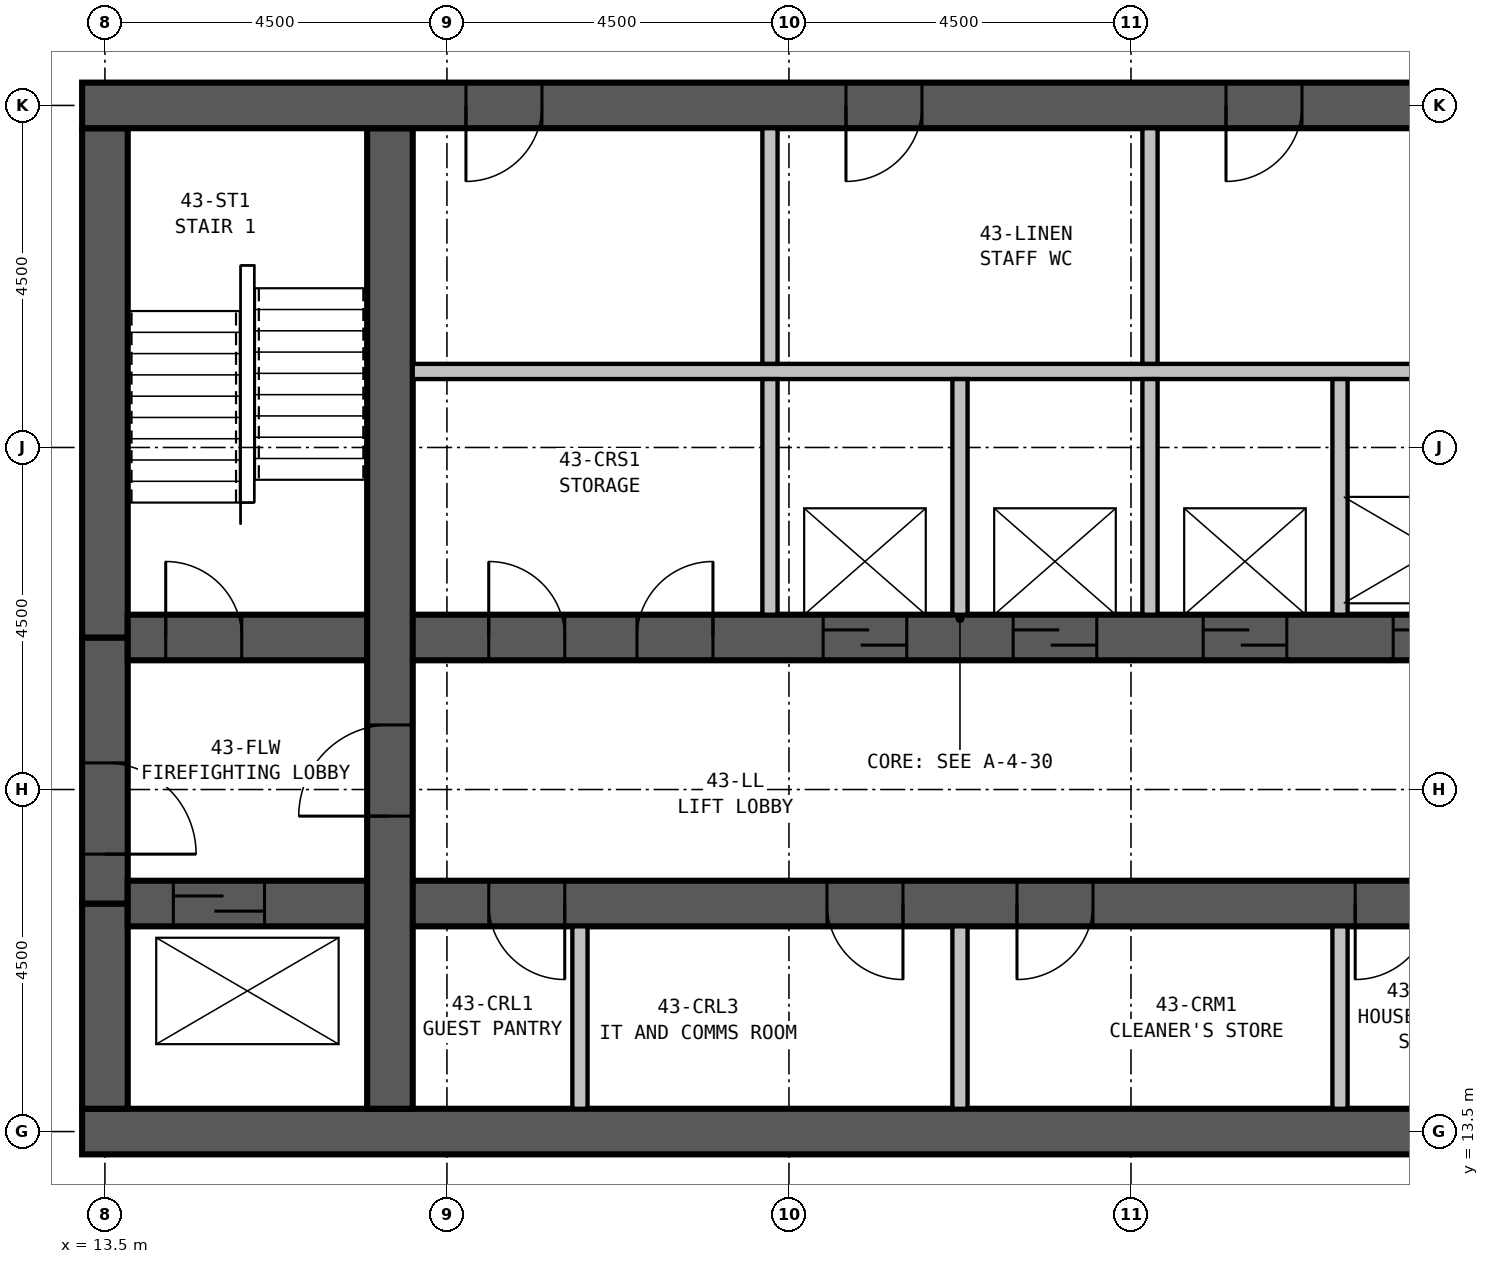
"""IFC4 building model, lengths in metres.
Left out: names, types, materials, properties, quantities, classifications, styles, units other than length and angle.
Written with IfcOpenShell. Run it as: python <this file> out.ifc"""

import sys

from ifc_helpers import new_model, si_unit, direction, frame, frame_2d, origin, place, context, subcontext, project, spatial, rectangle, extrude, element, fill, save


model = new_model("IFC4")
c1 = context("Model", 3, precision=1e-05, world=origin(), true_north=direction((0.0, 1.0)))
c2 = subcontext(c1, "Body", "Model", "MODEL_VIEW")
j1 = project(units=[si_unit("LENGTHUNIT", "METRE"), si_unit("PLANEANGLEUNIT", "RADIAN")], contexts=[c1])
p1 = place(None, origin())
s1 = spatial("IfcSite", under=j1, at=p1, CompositionType="ELEMENT")
p2 = place(p1, origin())
s2 = spatial("IfcBuilding", under=s1, at=p2, CompositionType="ELEMENT")
p3 = place(p2, frame((0.0, 0.0, 169.4)))
s3 = spatial("IfcBuildingStorey", under=s2, at=p3, CompositionType="ELEMENT", Elevation=169.4)
p4 = place(p3, frame((13.2, 13.5, 0.0), z_axis=(0.0, 0.0, 1.0), x_axis=(1.0, 0.0, 0.0)))
e1 = element("IfcWall", 1, at=p4, inside=s3, PredefinedType="SHEAR", context=c2, shape_type="SweptSolid", body=[
    extrude(rectangle(XDim=23.1, YDim=0.6, at=frame_2d((11.55, 0.0))), origin(), (0.0, 0.0, 1.0), 3.5),
])
p5 = place(p3, frame((36.3, 27.0, 0.0), z_axis=(0.0, 0.0, 1.0), x_axis=(-1.0, 0.0, 0.0)))
e2 = element("IfcWall", 2, at=p5, inside=s3, PredefinedType="SHEAR", context=c2, shape_type="SweptSolid", body=[
    extrude(rectangle(XDim=23.1, YDim=0.6, at=frame_2d((11.55, 0.0))), origin(), (0.0, 0.0, 1.0), 3.5),
])
p6 = place(p5, frame((17.05, 0.0, 0.0)))
e3 = element("IfcOpeningElement", 3, at=p6, cuts=e2, PredefinedType="OPENING", context=c2, shape_type="SweptSolid", body=[
    extrude(rectangle(XDim=1.0, YDim=2.1, at=frame_2d((0.5, 1.05))), frame((0.0, 0.31, 0.0), z_axis=(0.0, -1.0, 0.0), x_axis=(1.0, 0.0, 0.0)), (0.0, 0.0, 1.0), 0.62),
])
p7 = place(p5, frame((12.05, 0.0, 0.0)))
e4 = element("IfcOpeningElement", 4, at=p7, cuts=e2, PredefinedType="OPENING", context=c2, shape_type="SweptSolid", body=[
    extrude(rectangle(XDim=1.0, YDim=2.1, at=frame_2d((0.5, 1.05))), frame((0.0, 0.31, 0.0), z_axis=(0.0, -1.0, 0.0), x_axis=(1.0, 0.0, 0.0)), (0.0, 0.0, 1.0), 0.62),
])
p8 = place(p5, frame((7.05, 0.0, 0.0)))
e5 = element("IfcOpeningElement", 5, at=p8, cuts=e2, PredefinedType="OPENING", context=c2, shape_type="SweptSolid", body=[
    extrude(rectangle(XDim=1.0, YDim=2.1, at=frame_2d((0.5, 1.05))), frame((0.0, 0.31, 0.0), z_axis=(0.0, -1.0, 0.0), x_axis=(1.0, 0.0, 0.0)), (0.0, 0.0, 1.0), 0.62),
])
p9 = place(p3, frame((17.25, 13.8, 0.0), z_axis=(0.0, 0.0, 1.0), x_axis=(0.0, 1.0, 0.0)))
e6 = element("IfcWall", 6, at=p9, inside=s3, PredefinedType="SHEAR", context=c2, shape_type="SweptSolid", body=[
    extrude(rectangle(XDim=12.9, YDim=0.6, at=frame_2d((6.45, 0.0))), origin(), (0.0, 0.0, 1.0), 3.5),
])
p10 = place(p9, frame((3.85, 0.0, 0.0)))
e7 = element("IfcOpeningElement", 7, at=p10, cuts=e6, PredefinedType="OPENING", context=c2, shape_type="SweptSolid", body=[
    extrude(rectangle(XDim=1.2, YDim=2.1, at=frame_2d((0.6, 1.05))), frame((0.0, 0.31, 0.0), z_axis=(0.0, -1.0, 0.0), x_axis=(1.0, 0.0, 0.0)), (0.0, 0.0, 1.0), 0.62),
])
p11 = place(p3, frame((13.8, 16.5, 0.0), z_axis=(0.0, 0.0, 1.0), x_axis=(1.0, 0.0, 0.0)))
e8 = element("IfcWall", 8, at=p11, inside=s3, PredefinedType="SHEAR", context=c2, shape_type="SweptSolid", body=[
    extrude(rectangle(XDim=21.9, YDim=0.6, at=frame_2d((10.95, 0.0))), origin(), (0.0, 0.0, 1.0), 3.5),
])
p12 = place(p11, frame((5.75, 0.0, 0.0), z_axis=(0.0, 0.0, 1.0), x_axis=(-1.0, 0.0, 0.0)))
e9 = element("IfcOpeningElement", 9, at=p12, cuts=e8, PredefinedType="OPENING", context=c2, shape_type="SweptSolid", body=[
    extrude(rectangle(XDim=1.0, YDim=2.1, at=frame_2d((0.5, 1.05))), frame((0.0, 0.31, 0.0), z_axis=(0.0, -1.0, 0.0), x_axis=(1.0, 0.0, 0.0)), (0.0, 0.0, 1.0), 0.62),
])
p13 = place(p11, frame((10.2, 0.0, 0.0), z_axis=(0.0, 0.0, 1.0), x_axis=(-1.0, 0.0, 0.0)))
e10 = element("IfcOpeningElement", 10, at=p13, cuts=e8, PredefinedType="OPENING", context=c2, shape_type="SweptSolid", body=[
    extrude(rectangle(XDim=1.0, YDim=2.1, at=frame_2d((0.5, 1.05))), frame((0.0, 0.31, 0.0), z_axis=(0.0, -1.0, 0.0), x_axis=(1.0, 0.0, 0.0)), (0.0, 0.0, 1.0), 0.62),
])
p14 = place(p11, frame((12.7, 0.0, 0.0), z_axis=(0.0, 0.0, 1.0), x_axis=(-1.0, 0.0, 0.0)))
e11 = element("IfcOpeningElement", 11, at=p14, cuts=e8, PredefinedType="OPENING", context=c2, shape_type="SweptSolid", body=[
    extrude(rectangle(XDim=1.0, YDim=2.1, at=frame_2d((0.5, 1.05))), frame((0.0, 0.31, 0.0), z_axis=(0.0, -1.0, 0.0), x_axis=(1.0, 0.0, 0.0)), (0.0, 0.0, 1.0), 0.62),
])
p15 = place(p11, frame((17.15, 0.0, 0.0), z_axis=(0.0, 0.0, 1.0), x_axis=(-1.0, 0.0, 0.0)))
e12 = element("IfcOpeningElement", 12, at=p15, cuts=e8, PredefinedType="OPENING", context=c2, shape_type="SweptSolid", body=[
    extrude(rectangle(XDim=1.0, YDim=2.1, at=frame_2d((0.5, 1.05))), frame((0.0, 0.31, 0.0), z_axis=(0.0, -1.0, 0.0), x_axis=(1.0, 0.0, 0.0)), (0.0, 0.0, 1.0), 0.62),
])
p16 = place(p11, frame((0.6, 0.0, 0.0)))
e13 = element("IfcOpeningElement", 13, at=p16, cuts=e8, PredefinedType="OPENING", context=c2, shape_type="SweptSolid", body=[
    extrude(rectangle(XDim=1.2, YDim=2.1, at=frame_2d((0.6, 1.05))), frame((0.0, 0.31, 0.0), z_axis=(0.0, -1.0, 0.0), x_axis=(1.0, 0.0, 0.0)), (0.0, 0.0, 1.0), 0.62),
])
p17 = place(p11, frame((19.6, 0.0, 0.0)))
e14 = element("IfcOpeningElement", 14, at=p17, cuts=e8, PredefinedType="OPENING", context=c2, shape_type="SweptSolid", body=[
    extrude(rectangle(XDim=1.2, YDim=2.1, at=frame_2d((0.6, 1.05))), frame((0.0, 0.31, 0.0), z_axis=(0.0, -1.0, 0.0), x_axis=(1.0, 0.0, 0.0)), (0.0, 0.0, 1.0), 0.62),
])
p18 = place(p3, frame((13.8, 20.0, 0.0), z_axis=(0.0, 0.0, 1.0), x_axis=(1.0, 0.0, 0.0)))
e15 = element("IfcWall", 15, at=p18, inside=s3, PredefinedType="SHEAR", context=c2, shape_type="SweptSolid", body=[
    extrude(rectangle(XDim=21.9, YDim=0.6, at=frame_2d((10.95, 0.0))), origin(), (0.0, 0.0, 1.0), 3.5),
])
p19 = place(p18, frame((0.5, 0.0, 0.0)))
e16 = element("IfcOpeningElement", 16, at=p19, cuts=e15, PredefinedType="OPENING", context=c2, shape_type="SweptSolid", body=[
    extrude(rectangle(XDim=1.0, YDim=2.1, at=frame_2d((0.5, 1.05))), frame((0.0, 0.31, 0.0), z_axis=(0.0, -1.0, 0.0), x_axis=(1.0, 0.0, 0.0)), (0.0, 0.0, 1.0), 0.62),
])
p20 = place(p18, frame((20.5, 0.0, 0.0)))
e17 = element("IfcOpeningElement", 17, at=p20, cuts=e15, PredefinedType="OPENING", context=c2, shape_type="SweptSolid", body=[
    extrude(rectangle(XDim=1.0, YDim=2.1, at=frame_2d((0.5, 1.05))), frame((0.0, 0.31, 0.0), z_axis=(0.0, -1.0, 0.0), x_axis=(1.0, 0.0, 0.0)), (0.0, 0.0, 1.0), 0.62),
])
p21 = place(p18, frame((9.15, 0.0, 0.0)))
e18 = element("IfcOpeningElement", 18, at=p21, cuts=e15, PredefinedType="OPENING", context=c2, shape_type="SweptSolid", body=[
    extrude(rectangle(XDim=1.1, YDim=2.1, at=frame_2d((0.55, 1.05))), frame((0.0, 0.31, 0.0), z_axis=(0.0, -1.0, 0.0), x_axis=(1.0, 0.0, 0.0)), (0.0, 0.0, 1.0), 0.62),
])
p22 = place(p18, frame((11.65, 0.0, 0.0)))
e19 = element("IfcOpeningElement", 19, at=p22, cuts=e15, PredefinedType="OPENING", context=c2, shape_type="SweptSolid", body=[
    extrude(rectangle(XDim=1.1, YDim=2.1, at=frame_2d((0.55, 1.05))), frame((0.0, 0.31, 0.0), z_axis=(0.0, -1.0, 0.0), x_axis=(1.0, 0.0, 0.0)), (0.0, 0.0, 1.0), 0.62),
])
p23 = place(p18, frame((14.15, 0.0, 0.0)))
e20 = element("IfcOpeningElement", 20, at=p23, cuts=e15, PredefinedType="OPENING", context=c2, shape_type="SweptSolid", body=[
    extrude(rectangle(XDim=1.1, YDim=2.1, at=frame_2d((0.55, 1.05))), frame((0.0, 0.31, 0.0), z_axis=(0.0, -1.0, 0.0), x_axis=(1.0, 0.0, 0.0)), (0.0, 0.0, 1.0), 0.62),
])
p24 = place(p18, frame((16.65, 0.0, 0.0)))
e21 = element("IfcOpeningElement", 21, at=p24, cuts=e15, PredefinedType="OPENING", context=c2, shape_type="SweptSolid", body=[
    extrude(rectangle(XDim=1.1, YDim=2.1, at=frame_2d((0.55, 1.05))), frame((0.0, 0.31, 0.0), z_axis=(0.0, -1.0, 0.0), x_axis=(1.0, 0.0, 0.0)), (0.0, 0.0, 1.0), 0.62),
])
p25 = place(p18, frame((4.75, 0.0, 0.0)))
e22 = element("IfcOpeningElement", 22, at=p25, cuts=e15, PredefinedType="OPENING", context=c2, shape_type="SweptSolid", body=[
    extrude(rectangle(XDim=1.0, YDim=2.1, at=frame_2d((0.5, 1.05))), frame((0.0, 0.31, 0.0), z_axis=(0.0, -1.0, 0.0), x_axis=(1.0, 0.0, 0.0)), (0.0, 0.0, 1.0), 0.62),
])
p26 = place(p18, frame((6.7, 0.0, 0.0)))
e23 = element("IfcOpeningElement", 23, at=p26, cuts=e15, PredefinedType="OPENING", context=c2, shape_type="SweptSolid", body=[
    extrude(rectangle(XDim=1.0, YDim=2.1, at=frame_2d((0.5, 1.05))), frame((0.0, 0.31, 0.0), z_axis=(0.0, -1.0, 0.0), x_axis=(1.0, 0.0, 0.0)), (0.0, 0.0, 1.0), 0.62),
])
p27 = place(p3, frame((13.5, 26.7, 0.0), z_axis=(0.0, 0.0, 1.0), x_axis=(0.0, -1.0, 0.0)))
e24 = element("IfcWall", 24, at=p27, inside=s3, PredefinedType="SHEAR", context=c2, shape_type="SweptSolid", body=[
    extrude(rectangle(XDim=6.7, YDim=0.6, at=frame_2d((3.35, 0.0))), origin(), (0.0, 0.0, 1.0), 3.5),
])
p28 = place(p3, frame((13.5, 20.0, 0.0), z_axis=(0.0, 0.0, 1.0), x_axis=(0.0, -1.0, 0.0)))
e25 = element("IfcWall", 25, at=p28, inside=s3, PredefinedType="SHEAR", context=c2, shape_type="SweptSolid", body=[
    extrude(rectangle(XDim=3.5, YDim=0.6, at=frame_2d((1.75, 0.0))), origin(), (0.0, 0.0, 1.0), 3.5),
])
p29 = place(p28, frame((1.65, 0.0, 0.0)))
e26 = element("IfcOpeningElement", 26, at=p29, cuts=e25, PredefinedType="OPENING", context=c2, shape_type="SweptSolid", body=[
    extrude(rectangle(XDim=1.2, YDim=2.1, at=frame_2d((0.6, 1.05))), frame((0.0, 0.31, 0.0), z_axis=(0.0, -1.0, 0.0), x_axis=(1.0, 0.0, 0.0)), (0.0, 0.0, 1.0), 0.62),
])
p30 = place(p3, frame((13.5, 16.5, 0.0), z_axis=(0.0, 0.0, 1.0), x_axis=(0.0, -1.0, 0.0)))
e27 = element("IfcWall", 27, at=p30, inside=s3, PredefinedType="SHEAR", context=c2, shape_type="SweptSolid", body=[
    extrude(rectangle(XDim=2.7, YDim=0.6, at=frame_2d((1.35, 0.0))), origin(), (0.0, 0.0, 1.0), 3.5),
])
p31 = place(p3, frame((19.75, 13.8, 0.0), z_axis=(0.0, 0.0, 1.0), x_axis=(0.0, 1.0, 0.0)))
e28 = element("IfcWall", 28, at=p31, inside=s3, PredefinedType="PARTITIONING", context=c2, shape_type="SweptSolid", body=[
    extrude(rectangle(XDim=2.4, YDim=0.2, at=frame_2d((1.2, 0.0))), origin(), (0.0, 0.0, 1.0), 3.25),
])
p32 = place(p3, frame((22.25, 20.3, 0.0), z_axis=(0.0, 0.0, 1.0), x_axis=(0.0, 1.0, 0.0)))
e29 = element("IfcWall", 29, at=p32, inside=s3, PredefinedType="PARTITIONING", context=c2, shape_type="SweptSolid", body=[
    extrude(rectangle(XDim=3.1, YDim=0.2, at=frame_2d((1.55, 0.0))), origin(), (0.0, 0.0, 1.0), 3.25),
])
p33 = place(p3, frame((24.75, 13.8, 0.0), z_axis=(0.0, 0.0, 1.0), x_axis=(0.0, 1.0, 0.0)))
e30 = element("IfcWall", 30, at=p33, inside=s3, PredefinedType="PARTITIONING", context=c2, shape_type="SweptSolid", body=[
    extrude(rectangle(XDim=2.4, YDim=0.2, at=frame_2d((1.2, 0.0))), origin(), (0.0, 0.0, 1.0), 3.25),
])
for number, where, z_axis, x_axis in (
    (31, (24.75, 20.3, 0.0), (0.0, 0.0, 1.0), (0.0, 1.0, 0.0)),
    (32, (27.25, 20.3, 0.0), (0.0, 0.0, 1.0), (0.0, 1.0, 0.0)),
):
    element("IfcWall", number, at=place(p3, frame(where, z_axis=z_axis, x_axis=x_axis)), inside=s3, PredefinedType="PARTITIONING", context=c2, shape_type="SweptSolid", body=[
        extrude(rectangle(XDim=3.1, YDim=0.2, at=frame_2d((1.55, 0.0))), origin(), (0.0, 0.0, 1.0), 3.25),
    ])
p34 = place(p3, frame((29.75, 13.8, 0.0), z_axis=(0.0, 0.0, 1.0), x_axis=(0.0, 1.0, 0.0)))
e33 = element("IfcWall", 33, at=p34, inside=s3, PredefinedType="PARTITIONING", context=c2, shape_type="SweptSolid", body=[
    extrude(rectangle(XDim=2.4, YDim=0.2, at=frame_2d((1.2, 0.0))), origin(), (0.0, 0.0, 1.0), 3.25),
])
p35 = place(p3, frame((29.75, 20.3, 0.0), z_axis=(0.0, 0.0, 1.0), x_axis=(0.0, 1.0, 0.0)))
e34 = element("IfcWall", 34, at=p35, inside=s3, PredefinedType="PARTITIONING", context=c2, shape_type="SweptSolid", body=[
    extrude(rectangle(XDim=3.1, YDim=0.2, at=frame_2d((1.55, 0.0))), origin(), (0.0, 0.0, 1.0), 3.25),
])
p36 = place(p3, frame((17.55, 23.5, 0.0), z_axis=(0.0, 0.0, 1.0), x_axis=(1.0, 0.0, 0.0)))
e35 = element("IfcWall", 35, at=p36, inside=s3, PredefinedType="PARTITIONING", context=c2, shape_type="SweptSolid", body=[
    extrude(rectangle(XDim=14.4, YDim=0.2, at=frame_2d((7.2, 0.0))), origin(), (0.0, 0.0, 1.0), 3.25),
])
for number, where, z_axis, x_axis in (
    (36, (22.25, 23.6, 0.0), (0.0, 0.0, 1.0), (0.0, 1.0, 0.0)),
    (37, (27.25, 23.6, 0.0), (0.0, 0.0, 1.0), (0.0, 1.0, 0.0)),
):
    element("IfcWall", number, at=place(p3, frame(where, z_axis=z_axis, x_axis=x_axis)), inside=s3, PredefinedType="PARTITIONING", context=c2, shape_type="SweptSolid", body=[
        extrude(rectangle(XDim=3.1, YDim=0.2, at=frame_2d((1.55, 0.0))), origin(), (0.0, 0.0, 1.0), 3.25),
    ])
p37 = place(p29, origin())
e38 = element("IfcDoor", 38, at=p37, inside=s3, OperationType="SINGLE_SWING_RIGHT", PredefinedType="DOOR", context=c2, shape_type="SweptSolid", body=[
    extrude(rectangle(XDim=1.2, YDim=2.1, at=frame_2d((0.6, 1.05))), frame((0.0, 0.3, 0.0), z_axis=(0.0, -1.0, 0.0), x_axis=(1.0, 0.0, 0.0)), (0.0, 0.0, 1.0), 0.6),
])
fill(e26, e38)
p38 = place(p10, origin())
e39 = element("IfcDoor", 39, at=p38, inside=s3, OperationType="SINGLE_SWING_LEFT", PredefinedType="DOOR", context=c2, shape_type="SweptSolid", body=[
    extrude(rectangle(XDim=1.2, YDim=2.1, at=frame_2d((0.6, 1.05))), frame((0.0, 0.3, 0.0), z_axis=(0.0, -1.0, 0.0), x_axis=(1.0, 0.0, 0.0)), (0.0, 0.0, 1.0), 0.6),
])
fill(e7, e39)
p39 = place(p19, origin())
e40 = element("IfcDoor", 40, at=p39, inside=s3, OperationType="SINGLE_SWING_LEFT", PredefinedType="DOOR", context=c2, shape_type="SweptSolid", body=[
    extrude(rectangle(XDim=1.0, YDim=2.1, at=frame_2d((0.5, 1.05))), frame((0.0, 0.3, 0.0), z_axis=(0.0, -1.0, 0.0), x_axis=(1.0, 0.0, 0.0)), (0.0, 0.0, 1.0), 0.6),
])
fill(e16, e40)
p40 = place(p21, origin())
e41 = element("IfcDoor", 41, at=p40, inside=s3, OperationType="SLIDING_TO_LEFT", PredefinedType="DOOR", context=c2, shape_type="SweptSolid", body=[
    extrude(rectangle(XDim=1.1, YDim=2.1, at=frame_2d((0.55, 1.05))), frame((0.0, 0.3, 0.0), z_axis=(0.0, -1.0, 0.0), x_axis=(1.0, 0.0, 0.0)), (0.0, 0.0, 1.0), 0.6),
])
fill(e18, e41)
p41 = place(p22, origin())
e42 = element("IfcDoor", 42, at=p41, inside=s3, OperationType="SLIDING_TO_LEFT", PredefinedType="DOOR", context=c2, shape_type="SweptSolid", body=[
    extrude(rectangle(XDim=1.1, YDim=2.1, at=frame_2d((0.55, 1.05))), frame((0.0, 0.3, 0.0), z_axis=(0.0, -1.0, 0.0), x_axis=(1.0, 0.0, 0.0)), (0.0, 0.0, 1.0), 0.6),
])
fill(e19, e42)
p42 = place(p23, origin())
e43 = element("IfcDoor", 43, at=p42, inside=s3, OperationType="SLIDING_TO_LEFT", PredefinedType="DOOR", context=c2, shape_type="SweptSolid", body=[
    extrude(rectangle(XDim=1.1, YDim=2.1, at=frame_2d((0.55, 1.05))), frame((0.0, 0.3, 0.0), z_axis=(0.0, -1.0, 0.0), x_axis=(1.0, 0.0, 0.0)), (0.0, 0.0, 1.0), 0.6),
])
fill(e20, e43)
p43 = place(p24, origin())
e44 = element("IfcDoor", 44, at=p43, inside=s3, OperationType="SLIDING_TO_LEFT", PredefinedType="DOOR", context=c2, shape_type="SweptSolid", body=[
    extrude(rectangle(XDim=1.1, YDim=2.1, at=frame_2d((0.55, 1.05))), frame((0.0, 0.3, 0.0), z_axis=(0.0, -1.0, 0.0), x_axis=(1.0, 0.0, 0.0)), (0.0, 0.0, 1.0), 0.6),
])
fill(e21, e44)
p44 = place(p12, origin())
e45 = element("IfcDoor", 45, at=p44, inside=s3, OperationType="SINGLE_SWING_LEFT", PredefinedType="DOOR", context=c2, shape_type="SweptSolid", body=[
    extrude(rectangle(XDim=1.0, YDim=2.1, at=frame_2d((0.5, 1.05))), frame((0.0, 0.3, 0.0), z_axis=(0.0, -1.0, 0.0), x_axis=(1.0, 0.0, 0.0)), (0.0, 0.0, 1.0), 0.6),
])
fill(e9, e45)
p45 = place(p13, origin())
e46 = element("IfcDoor", 46, at=p45, inside=s3, OperationType="SINGLE_SWING_LEFT", PredefinedType="DOOR", context=c2, shape_type="SweptSolid", body=[
    extrude(rectangle(XDim=1.0, YDim=2.1, at=frame_2d((0.5, 1.05))), frame((0.0, 0.3, 0.0), z_axis=(0.0, -1.0, 0.0), x_axis=(1.0, 0.0, 0.0)), (0.0, 0.0, 1.0), 0.6),
])
fill(e10, e46)
p46 = place(p14, origin())
e47 = element("IfcDoor", 47, at=p46, inside=s3, OperationType="SINGLE_SWING_RIGHT", PredefinedType="DOOR", context=c2, shape_type="SweptSolid", body=[
    extrude(rectangle(XDim=1.0, YDim=2.1, at=frame_2d((0.5, 1.05))), frame((0.0, 0.3, 0.0), z_axis=(0.0, -1.0, 0.0), x_axis=(1.0, 0.0, 0.0)), (0.0, 0.0, 1.0), 0.6),
])
fill(e11, e47)
p47 = place(p15, origin())
e48 = element("IfcDoor", 48, at=p47, inside=s3, OperationType="SINGLE_SWING_RIGHT", PredefinedType="DOOR", context=c2, shape_type="SweptSolid", body=[
    extrude(rectangle(XDim=1.0, YDim=2.1, at=frame_2d((0.5, 1.05))), frame((0.0, 0.3, 0.0), z_axis=(0.0, -1.0, 0.0), x_axis=(1.0, 0.0, 0.0)), (0.0, 0.0, 1.0), 0.6),
])
fill(e12, e48)
p48 = place(p25, origin())
e49 = element("IfcDoor", 49, at=p48, inside=s3, OperationType="SINGLE_SWING_LEFT", PredefinedType="DOOR", context=c2, shape_type="SweptSolid", body=[
    extrude(rectangle(XDim=1.0, YDim=2.1, at=frame_2d((0.5, 1.05))), frame((0.0, 0.3, 0.0), z_axis=(0.0, -1.0, 0.0), x_axis=(1.0, 0.0, 0.0)), (0.0, 0.0, 1.0), 0.6),
])
fill(e22, e49)
p49 = place(p26, origin())
e50 = element("IfcDoor", 50, at=p49, inside=s3, OperationType="SINGLE_SWING_RIGHT", PredefinedType="DOOR", context=c2, shape_type="SweptSolid", body=[
    extrude(rectangle(XDim=1.0, YDim=2.1, at=frame_2d((0.5, 1.05))), frame((0.0, 0.3, 0.0), z_axis=(0.0, -1.0, 0.0), x_axis=(1.0, 0.0, 0.0)), (0.0, 0.0, 1.0), 0.6),
])
fill(e23, e50)
p50 = place(p16, origin())
e51 = element("IfcDoor", 51, at=p50, inside=s3, OperationType="SLIDING_TO_LEFT", PredefinedType="DOOR", context=c2, shape_type="SweptSolid", body=[
    extrude(rectangle(XDim=1.2, YDim=2.1, at=frame_2d((0.6, 1.05))), frame((0.0, 0.3, 0.0), z_axis=(0.0, -1.0, 0.0), x_axis=(1.0, 0.0, 0.0)), (0.0, 0.0, 1.0), 0.6),
])
fill(e13, e51)
p51 = place(p6, origin())
e52 = element("IfcDoor", 52, at=p51, inside=s3, OperationType="SINGLE_SWING_RIGHT", PredefinedType="DOOR", context=c2, shape_type="SweptSolid", body=[
    extrude(rectangle(XDim=1.0, YDim=2.1, at=frame_2d((0.5, 1.05))), frame((0.0, 0.3, 0.0), z_axis=(0.0, -1.0, 0.0), x_axis=(1.0, 0.0, 0.0)), (0.0, 0.0, 1.0), 0.6),
])
fill(e3, e52)
p52 = place(p7, origin())
e53 = element("IfcDoor", 53, at=p52, inside=s3, OperationType="SINGLE_SWING_RIGHT", PredefinedType="DOOR", context=c2, shape_type="SweptSolid", body=[
    extrude(rectangle(XDim=1.0, YDim=2.1, at=frame_2d((0.5, 1.05))), frame((0.0, 0.3, 0.0), z_axis=(0.0, -1.0, 0.0), x_axis=(1.0, 0.0, 0.0)), (0.0, 0.0, 1.0), 0.6),
])
fill(e4, e53)
p53 = place(p8, origin())
e54 = element("IfcDoor", 54, at=p53, inside=s3, OperationType="SINGLE_SWING_RIGHT", PredefinedType="DOOR", context=c2, shape_type="SweptSolid", body=[
    extrude(rectangle(XDim=1.0, YDim=2.1, at=frame_2d((0.5, 1.05))), frame((0.0, 0.3, 0.0), z_axis=(0.0, -1.0, 0.0), x_axis=(1.0, 0.0, 0.0)), (0.0, 0.0, 1.0), 0.6),
])
fill(e5, e54)
save(model, sys.argv[1])
